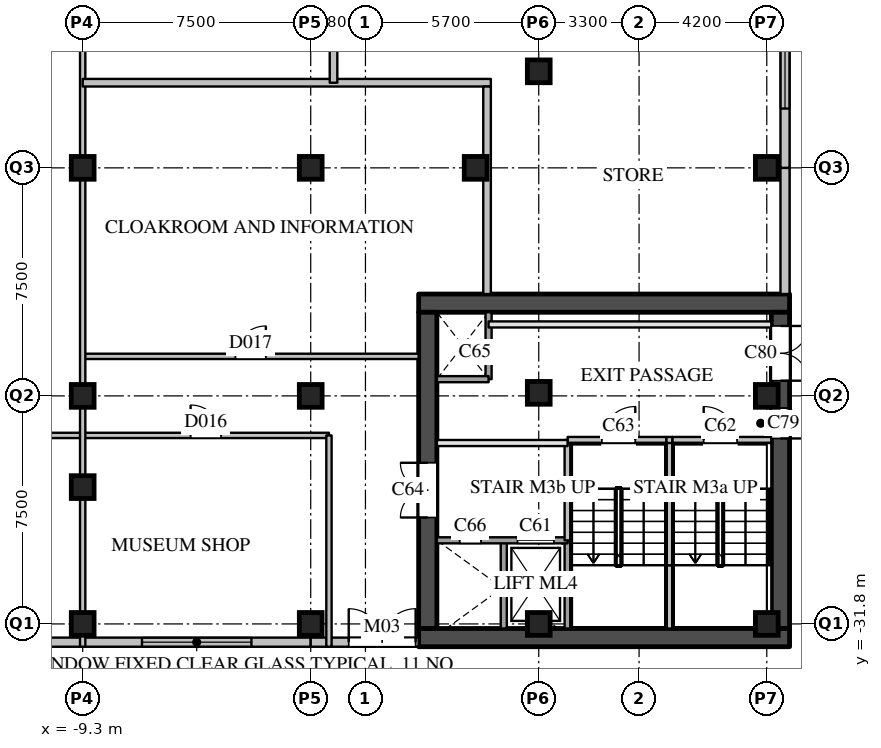
"""IFC4 building model, lengths in metres.
Left out: names, types, materials, properties, quantities, classifications, styles, units other than length and angle.
Written with IfcOpenShell. Run it as: python <this file> out.ifc"""

import sys

from ifc_helpers import new_model, si_unit, direction, frame, frame_2d, origin, origin_2d, place, context, subcontext, project, spatial, rectangle, extrude, element, fill, save


model = new_model("IFC4")
c1 = context("Model", 3, precision=1e-05, world=origin(), true_north=direction((0.0, 1.0)))
c2 = subcontext(c1, "Body", "Model", "MODEL_VIEW")
j1 = project(units=[si_unit("LENGTHUNIT", "METRE"), si_unit("PLANEANGLEUNIT", "RADIAN")], contexts=[c1])
p1 = place(None, origin())
s1 = spatial("IfcSite", under=j1, at=p1, CompositionType="ELEMENT")
p2 = place(p1, origin())
s2 = spatial("IfcBuilding", under=s1, at=p2, CompositionType="ELEMENT")
p3 = place(p2, origin())
s3 = spatial("IfcBuildingStorey", under=s2, at=p3, CompositionType="ELEMENT", Elevation=0.0)
for number, where, z_axis, x_axis in (
    (1, (-9.3, -31.8, 0.0), (0.0, 0.0, 1.0), (1.0, 0.0, 0.0)),
    (2, (-9.3, -24.3, 0.0), (0.0, 0.0, 1.0), (1.0, 0.0, 0.0)),
    (3, (-9.3, -16.8, 0.0), (0.0, 0.0, 1.0), (1.0, 0.0, 0.0)),
    (4, (-1.8, -31.8, 0.0), (0.0, 0.0, 1.0), (1.0, 0.0, 0.0)),
    (5, (-1.8, -24.3, 0.0), (0.0, 0.0, 1.0), (1.0, 0.0, 0.0)),
    (6, (-1.8, -16.8, 0.0), (0.0, 0.0, 1.0), (1.0, 0.0, 0.0)),
    (7, (5.7, -31.8, 0.0), (0.0, 0.0, 1.0), (1.0, 0.0, 0.0)),
    (8, (5.7, -24.2, 0.0), (0.0, 0.0, 1.0), (1.0, 0.0, 0.0)),
    (9, (13.2, -31.8, 0.0), (0.0, 0.0, 1.0), (1.0, 0.0, 0.0)),
    (10, (13.2, -24.3, 0.0), (0.0, 0.0, 1.0), (1.0, 0.0, 0.0)),
    (11, (13.2, -16.8, 0.0), (0.0, 0.0, 1.0), (1.0, 0.0, 0.0)),
    (12, (-9.3, -27.3, 0.0), (0.0, 0.0, 1.0), (1.0, 0.0, 0.0)),
    (13, (3.625, -16.8, 0.0), (0.0, 0.0, 1.0), (1.0, 0.0, 0.0)),
    (14, (5.7, -13.625, 0.0), (0.0, 0.0, 1.0), (1.0, 0.0, 0.0)),
):
    element("IfcColumn", number, at=place(p3, frame(where, z_axis=z_axis, x_axis=x_axis)), inside=s3, PredefinedType="COLUMN", context=c2, shape_type="SweptSolid", body=[
        extrude(rectangle(XDim=0.75, YDim=0.75, at=origin_2d()), origin(), (0.0, 0.0, 1.0), 8.0),
    ])
p4 = place(p3, frame((-16.8, -32.4, 0.0), z_axis=(0.0, 0.0, 1.0), x_axis=(1.0, 0.0, 0.0)))
e15 = element("IfcWall", 15, at=p4, inside=s3, PredefinedType="SOLIDWALL", context=c2, shape_type="SweptSolid", body=[
    extrude(rectangle(XDim=7.5, YDim=0.3, at=frame_2d((3.75, 0.0))), origin(), (0.0, 0.0, 1.0), 7.59),
])
p5 = place(p4, frame((1.25, 0.0, 0.0)))
e16 = element("IfcOpeningElement", 16, at=p5, cuts=e15, PredefinedType="OPENING", context=c2, shape_type="SweptSolid", body=[
    extrude(rectangle(XDim=2.2, YDim=2.4, at=frame_2d((1.1, 1.2))), frame((0.0, 0.16, 0.0), z_axis=(0.0, -1.0, 0.0), x_axis=(1.0, 0.0, 0.0)), (0.0, 0.0, 1.0), 0.32),
])
p6 = place(p4, frame((4.05, 0.0, 0.0)))
e17 = element("IfcOpeningElement", 17, at=p6, cuts=e15, PredefinedType="OPENING", context=c2, shape_type="SweptSolid", body=[
    extrude(rectangle(XDim=2.2, YDim=2.4, at=frame_2d((1.1, 1.2))), frame((0.0, 0.16, 0.0), z_axis=(0.0, -1.0, 0.0), x_axis=(1.0, 0.0, 0.0)), (0.0, 0.0, 1.0), 0.32),
])
p7 = place(p3, frame((-9.3, -32.4, 0.0), z_axis=(0.0, 0.0, 1.0), x_axis=(1.0, 0.0, 0.0)))
e18 = element("IfcWall", 18, at=p7, inside=s3, PredefinedType="SOLIDWALL", context=c2, shape_type="SweptSolid", body=[
    extrude(rectangle(XDim=7.5, YDim=0.3, at=frame_2d((3.75, 0.0))), origin(), (0.0, 0.0, 1.0), 7.59),
])
p8 = place(p7, frame((1.95, 0.0, 0.9)))
e19 = element("IfcOpeningElement", 19, at=p8, cuts=e18, PredefinedType="OPENING", context=c2, shape_type="SweptSolid", body=[
    extrude(rectangle(XDim=3.6, YDim=3.0, at=frame_2d((1.8, 1.5))), frame((0.0, 0.16, 0.0), z_axis=(0.0, -1.0, 0.0), x_axis=(1.0, 0.0, 0.0)), (0.0, 0.0, 1.0), 0.32),
])
p9 = place(p3, frame((-1.8, -32.4, 0.0), z_axis=(0.0, 0.0, 1.0), x_axis=(1.0, 0.0, 0.0)))
e20 = element("IfcWall", 20, at=p9, inside=s3, PredefinedType="SOLIDWALL", context=c2, shape_type="SweptSolid", body=[
    extrude(rectangle(XDim=3.55, YDim=0.3, at=frame_2d((1.775, 0.0))), origin(), (0.0, 0.0, 1.0), 7.59),
])
p10 = place(p9, frame((1.25, 0.0, 0.0)))
e21 = element("IfcOpeningElement", 21, at=p10, cuts=e20, PredefinedType="OPENING", context=c2, shape_type="SweptSolid", body=[
    extrude(rectangle(XDim=2.2, YDim=2.4, at=frame_2d((1.1, 1.2))), frame((0.0, 0.16, 0.0), z_axis=(0.0, -1.0, 0.0), x_axis=(1.0, 0.0, 0.0)), (0.0, 0.0, 1.0), 0.32),
])
p11 = place(p3, frame((13.8, -20.95, 0.0), z_axis=(0.0, 0.0, 1.0), x_axis=(0.0, 1.0, 0.0)))
e22 = element("IfcWall", 22, at=p11, inside=s3, PredefinedType="SOLIDWALL", context=c2, shape_type="SweptSolid", body=[
    extrude(rectangle(XDim=4.15, YDim=0.3, at=frame_2d((2.075, 0.0))), origin(), (0.0, 0.0, 1.0), 7.59),
])
p12 = place(p3, frame((13.8, -16.8, 0.0), z_axis=(0.0, 0.0, 1.0), x_axis=(0.0, 1.0, 0.0)))
e23 = element("IfcWall", 23, at=p12, inside=s3, PredefinedType="SOLIDWALL", context=c2, shape_type="SweptSolid", body=[
    extrude(rectangle(XDim=7.5, YDim=0.3, at=frame_2d((3.75, 0.0))), origin(), (0.0, 0.0, 1.0), 7.59),
])
p13 = place(p12, frame((1.95, 0.0, 0.9)))
e24 = element("IfcOpeningElement", 24, at=p13, cuts=e23, PredefinedType="OPENING", context=c2, shape_type="SweptSolid", body=[
    extrude(rectangle(XDim=3.6, YDim=3.0, at=frame_2d((1.8, 1.5))), frame((0.0, 0.16, 0.0), z_axis=(0.0, -1.0, 0.0), x_axis=(1.0, 0.0, 0.0)), (0.0, 0.0, 1.0), 0.32),
])
for number, where, z_axis, x_axis in (
    (25, (1.75, -32.25, 0.0), (0.0, 0.0, 1.0), (1.0, 0.0, 0.0)),
    (26, (1.75, -21.25, 0.0), (0.0, 0.0, 1.0), (1.0, 0.0, 0.0)),
):
    element("IfcWall", number, at=place(p3, frame(where, z_axis=z_axis, x_axis=x_axis)), inside=s3, PredefinedType="SHEAR", context=c2, shape_type="SweptSolid", body=[
        extrude(rectangle(XDim=12.2, YDim=0.6, at=frame_2d((6.1, 0.0))), origin(), (0.0, 0.0, 1.0), 7.59),
    ])
p14 = place(p3, frame((2.05, -31.95, 0.0), z_axis=(0.0, 0.0, 1.0), x_axis=(0.0, 1.0, 0.0)))
e27 = element("IfcWall", 27, at=p14, inside=s3, PredefinedType="SHEAR", context=c2, shape_type="SweptSolid", body=[
    extrude(rectangle(XDim=10.4, YDim=0.6, at=frame_2d((5.2, 0.0))), origin(), (0.0, 0.0, 1.0), 7.59),
])
p15 = place(p14, frame((3.65, 0.0, 0.0)))
e28 = element("IfcOpeningElement", 28, at=p15, cuts=e27, PredefinedType="OPENING", context=c2, shape_type="SweptSolid", body=[
    extrude(rectangle(XDim=1.8, YDim=2.1, at=frame_2d((0.9, 1.05))), frame((0.0, 0.31, 0.0), z_axis=(0.0, -1.0, 0.0), x_axis=(1.0, 0.0, 0.0)), (0.0, 0.0, 1.0), 0.62),
])
p16 = place(p3, frame((13.65, -31.95, 0.0), z_axis=(0.0, 0.0, 1.0), x_axis=(0.0, 1.0, 0.0)))
e29 = element("IfcWall", 29, at=p16, inside=s3, PredefinedType="SHEAR", context=c2, shape_type="SweptSolid", body=[
    extrude(rectangle(XDim=10.4, YDim=0.6, at=frame_2d((5.2, 0.0))), origin(), (0.0, 0.0, 1.0), 7.59),
])
p17 = place(p16, frame((7.25, 0.0, 0.0), z_axis=(0.0, 0.0, 1.0), x_axis=(-1.0, 0.0, 0.0)))
e30 = element("IfcOpeningElement", 30, at=p17, cuts=e29, PredefinedType="OPENING", context=c2, shape_type="SweptSolid", body=[
    extrude(rectangle(XDim=1.0, YDim=2.1, at=frame_2d((0.5, 1.05))), frame((0.0, 0.31, 0.0), z_axis=(0.0, -1.0, 0.0), x_axis=(1.0, 0.0, 0.0)), (0.0, 0.0, 1.0), 0.62),
])
p18 = place(p16, frame((9.95, 0.0, 0.0), z_axis=(0.0, 0.0, 1.0), x_axis=(-1.0, 0.0, 0.0)))
e31 = element("IfcOpeningElement", 31, at=p18, cuts=e29, PredefinedType="OPENING", context=c2, shape_type="SweptSolid", body=[
    extrude(rectangle(XDim=1.8, YDim=2.4, at=frame_2d((0.9, 1.2))), frame((0.0, 0.31, 0.0), z_axis=(0.0, -1.0, 0.0), x_axis=(1.0, 0.0, 0.0)), (0.0, 0.0, 1.0), 0.62),
])
p19 = place(p3, frame((4.05, -23.75, 0.0), z_axis=(0.0, 0.0, 1.0), x_axis=(0.0, 1.0, 0.0)))
e32 = element("IfcWall", 32, at=p19, inside=s3, PredefinedType="SOLIDWALL", context=c2, shape_type="SweptSolid", body=[
    extrude(rectangle(XDim=2.2, YDim=0.2, at=frame_2d((1.1, 0.0))), origin(), (0.0, 0.0, 1.0), 7.59),
])
p20 = place(p19, frame((0.55, 0.0, 0.0)))
e33 = element("IfcOpeningElement", 33, at=p20, cuts=e32, PredefinedType="OPENING", context=c2, shape_type="SweptSolid", body=[
    extrude(rectangle(XDim=0.7, YDim=2.1, at=frame_2d((0.35, 1.05))), frame((0.0, 0.11, 0.0), z_axis=(0.0, -1.0, 0.0), x_axis=(1.0, 0.0, 0.0)), (0.0, 0.0, 1.0), 0.22),
])
for number, where, z_axis, x_axis in (
    (34, (4.55, -31.95, 0.0), (0.0, 0.0, 1.0), (0.0, 1.0, 0.0)),
    (35, (6.65, -31.95, 0.0), (0.0, 0.0, 1.0), (0.0, 1.0, 0.0)),
):
    element("IfcWall", number, at=place(p3, frame(where, z_axis=z_axis, x_axis=x_axis)), inside=s3, PredefinedType="SOLIDWALL", context=c2, shape_type="SweptSolid", body=[
        extrude(rectangle(XDim=2.9, YDim=0.2, at=frame_2d((1.45, 0.0))), origin(), (0.0, 0.0, 1.0), 7.59),
    ])
p21 = place(p3, frame((6.65, -29.05, 0.0), z_axis=(0.0, 0.0, 1.0), x_axis=(0.0, 1.0, 0.0)))
e36 = element("IfcWall", 36, at=p21, inside=s3, PredefinedType="SOLIDWALL", context=c2, shape_type="SweptSolid", body=[
    extrude(rectangle(XDim=1.7, YDim=0.2, at=frame_2d((0.85, 0.0))), origin(), (0.0, 0.0, 1.0), 7.59),
])
p22 = place(p3, frame((6.65, -27.35, 0.0), z_axis=(0.0, 0.0, 1.0), x_axis=(0.0, 1.0, 0.0)))
e37 = element("IfcWall", 37, at=p22, inside=s3, PredefinedType="SOLIDWALL", context=c2, shape_type="SweptSolid", body=[
    extrude(rectangle(XDim=1.6, YDim=0.2, at=frame_2d((0.8, 0.0))), origin(), (0.0, 0.0, 1.0), 7.59),
])
p23 = place(p3, frame((10.0, -31.95, 0.0), z_axis=(0.0, 0.0, 1.0), x_axis=(0.0, 1.0, 0.0)))
e38 = element("IfcWall", 38, at=p23, inside=s3, PredefinedType="SOLIDWALL", context=c2, shape_type="SweptSolid", body=[
    extrude(rectangle(XDim=2.08, YDim=0.2, at=frame_2d((1.04, 0.0))), origin(), (0.0, 0.0, 1.0), 7.59),
])
p24 = place(p3, frame((10.0, -29.87, 0.0), z_axis=(0.0, 0.0, 1.0), x_axis=(0.0, 1.0, 0.0)))
e39 = element("IfcWall", 39, at=p24, inside=s3, PredefinedType="SOLIDWALL", context=c2, shape_type="SweptSolid", body=[
    extrude(rectangle(XDim=2.52, YDim=0.2, at=frame_2d((1.26, 0.0))), origin(), (0.0, 0.0, 1.0), 7.59),
])
p25 = place(p3, frame((10.0, -27.35, 0.0), z_axis=(0.0, 0.0, 1.0), x_axis=(0.0, 1.0, 0.0)))
e40 = element("IfcWall", 40, at=p25, inside=s3, PredefinedType="SOLIDWALL", context=c2, shape_type="SweptSolid", body=[
    extrude(rectangle(XDim=1.6, YDim=0.2, at=frame_2d((0.8, 0.0))), origin(), (0.0, 0.0, 1.0), 7.59),
])
p26 = place(p3, frame((2.35, -29.05, 0.0), z_axis=(0.0, 0.0, 1.0), x_axis=(1.0, 0.0, 0.0)))
e41 = element("IfcWall", 41, at=p26, inside=s3, PredefinedType="SOLIDWALL", context=c2, shape_type="SweptSolid", body=[
    extrude(rectangle(XDim=4.3, YDim=0.2, at=frame_2d((2.15, 0.0))), origin(), (0.0, 0.0, 1.0), 7.59),
])
p27 = place(p26, frame((2.65, 0.0, 0.0)))
e42 = element("IfcOpeningElement", 42, at=p27, cuts=e41, PredefinedType="OPENING", context=c2, shape_type="SweptSolid", body=[
    extrude(rectangle(XDim=1.2, YDim=2.1, at=frame_2d((0.6, 1.05))), frame((0.0, 0.11, 0.0), z_axis=(0.0, -1.0, 0.0), x_axis=(1.0, 0.0, 0.0)), (0.0, 0.0, 1.0), 0.22),
])
p28 = place(p26, frame((0.75, 0.0, 0.0)))
e43 = element("IfcOpeningElement", 43, at=p28, cuts=e41, PredefinedType="OPENING", context=c2, shape_type="SweptSolid", body=[
    extrude(rectangle(XDim=0.7, YDim=2.1, at=frame_2d((0.35, 1.05))), frame((0.0, 0.11, 0.0), z_axis=(0.0, -1.0, 0.0), x_axis=(1.0, 0.0, 0.0)), (0.0, 0.0, 1.0), 0.22),
])
p29 = place(p3, frame((2.35, -25.85, 0.0), z_axis=(0.0, 0.0, 1.0), x_axis=(1.0, 0.0, 0.0)))
e44 = element("IfcWall", 44, at=p29, inside=s3, PredefinedType="PARTITIONING", context=c2, shape_type="SweptSolid", body=[
    extrude(rectangle(XDim=4.3, YDim=0.2, at=frame_2d((2.15, 0.0))), origin(), (0.0, 0.0, 1.0), 7.59),
])
p30 = place(p3, frame((6.65, -25.75, 0.0), z_axis=(0.0, 0.0, 1.0), x_axis=(1.0, 0.0, 0.0)))
e45 = element("IfcWall", 45, at=p30, inside=s3, PredefinedType="SOLIDWALL", context=c2, shape_type="SweptSolid", body=[
    extrude(rectangle(XDim=3.25, YDim=0.2, at=frame_2d((1.625, 0.0))), origin(), (0.0, 0.0, 1.0), 7.59),
])
p31 = place(p30, frame((1.125, 0.0, 0.0)))
e46 = element("IfcOpeningElement", 46, at=p31, cuts=e45, PredefinedType="OPENING", context=c2, shape_type="SweptSolid", body=[
    extrude(rectangle(XDim=1.1, YDim=2.1, at=frame_2d((0.55, 1.05))), frame((0.0, 0.11, 0.0), z_axis=(0.0, -1.0, 0.0), x_axis=(1.0, 0.0, 0.0)), (0.0, 0.0, 1.0), 0.22),
])
p32 = place(p3, frame((9.9, -25.75, 0.0), z_axis=(0.0, 0.0, 1.0), x_axis=(1.0, 0.0, 0.0)))
e47 = element("IfcWall", 47, at=p32, inside=s3, PredefinedType="SOLIDWALL", context=c2, shape_type="SweptSolid", body=[
    extrude(rectangle(XDim=0.2, YDim=0.2, at=frame_2d((0.1, 0.0))), origin(), (0.0, 0.0, 1.0), 7.59),
])
p33 = place(p3, frame((10.1, -25.75, 0.0), z_axis=(0.0, 0.0, 1.0), x_axis=(1.0, 0.0, 0.0)))
e48 = element("IfcWall", 48, at=p33, inside=s3, PredefinedType="SOLIDWALL", context=c2, shape_type="SweptSolid", body=[
    extrude(rectangle(XDim=3.25, YDim=0.2, at=frame_2d((1.625, 0.0))), origin(), (0.0, 0.0, 1.0), 7.59),
])
p34 = place(p33, frame((1.025, 0.0, 0.0)))
e49 = element("IfcOpeningElement", 49, at=p34, cuts=e48, PredefinedType="OPENING", context=c2, shape_type="SweptSolid", body=[
    extrude(rectangle(XDim=1.1, YDim=2.1, at=frame_2d((0.55, 1.05))), frame((0.0, 0.11, 0.0), z_axis=(0.0, -1.0, 0.0), x_axis=(1.0, 0.0, 0.0)), (0.0, 0.0, 1.0), 0.22),
])
p35 = place(p3, frame((2.35, -23.75, 0.0), z_axis=(0.0, 0.0, 1.0), x_axis=(1.0, 0.0, 0.0)))
e50 = element("IfcWall", 50, at=p35, inside=s3, PredefinedType="SOLIDWALL", context=c2, shape_type="SweptSolid", body=[
    extrude(rectangle(XDim=1.7, YDim=0.2, at=frame_2d((0.85, 0.0))), origin(), (0.0, 0.0, 1.0), 7.59),
])
p36 = place(p3, frame((4.05, -21.95, 0.0), z_axis=(0.0, 0.0, 1.0), x_axis=(1.0, 0.0, 0.0)))
e51 = element("IfcWall", 51, at=p36, inside=s3, PredefinedType="PARTITIONING", context=c2, shape_type="SweptSolid", body=[
    extrude(rectangle(XDim=9.3, YDim=0.2, at=frame_2d((4.65, 0.0))), origin(), (0.0, 0.0, 1.0), 7.59),
])
p37 = place(p3, frame((-20.35, -25.6, 0.0), z_axis=(0.0, 0.0, 1.0), x_axis=(1.0, 0.0, 0.0)))
e52 = element("IfcWall", 52, at=p37, inside=s3, PredefinedType="PARTITIONING", context=c2, shape_type="SweptSolid", body=[
    extrude(rectangle(XDim=19.15, YDim=0.175, at=frame_2d((9.575, 0.0))), origin(), (0.0, 0.0, 1.0), 6.79),
])
p38 = place(p37, frame((4.625, 0.0, 0.0)))
e53 = element("IfcOpeningElement", 53, at=p38, cuts=e52, PredefinedType="OPENING", context=c2, shape_type="SweptSolid", body=[
    extrude(rectangle(XDim=1.8, YDim=2.1, at=frame_2d((0.9, 1.05))), frame((0.0, 0.097, 0.0), z_axis=(0.0, -1.0, 0.0), x_axis=(1.0, 0.0, 0.0)), (0.0, 0.0, 1.0), 0.195),
])
p39 = place(p37, frame((14.6, 0.0, 0.0)))
e54 = element("IfcOpeningElement", 54, at=p39, cuts=e52, PredefinedType="OPENING", context=c2, shape_type="SweptSolid", body=[
    extrude(rectangle(XDim=1.0, YDim=2.1, at=frame_2d((0.5, 1.05))), frame((0.0, 0.097, 0.0), z_axis=(0.0, -1.0, 0.0), x_axis=(1.0, 0.0, 0.0)), (0.0, 0.0, 1.0), 0.195),
])
p40 = place(p3, frame((-9.3, -23.0, 0.0), z_axis=(0.0, 0.0, 1.0), x_axis=(1.0, 0.0, 0.0)))
e55 = element("IfcWall", 55, at=p40, inside=s3, PredefinedType="PARTITIONING", context=c2, shape_type="SweptSolid", body=[
    extrude(rectangle(XDim=11.05, YDim=0.175, at=frame_2d((5.525, 0.0))), origin(), (0.0, 0.0, 1.0), 6.79),
])
p41 = place(p40, frame((5.025, 0.0, 0.0)))
e56 = element("IfcOpeningElement", 56, at=p41, cuts=e55, PredefinedType="OPENING", context=c2, shape_type="SweptSolid", body=[
    extrude(rectangle(XDim=1.0, YDim=2.1, at=frame_2d((0.5, 1.05))), frame((0.0, 0.097, 0.0), z_axis=(0.0, -1.0, 0.0), x_axis=(1.0, 0.0, 0.0)), (0.0, 0.0, 1.0), 0.195),
])
p42 = place(p3, frame((-9.3, -32.55, 0.0), z_axis=(0.0, 0.0, 1.0), x_axis=(0.0, 1.0, 0.0)))
e57 = element("IfcWall", 57, at=p42, inside=s3, PredefinedType="PARTITIONING", context=c2, shape_type="SweptSolid", body=[
    extrude(rectangle(XDim=23.25, YDim=0.175, at=frame_2d((11.625, 0.0))), origin(), (0.0, 0.0, 1.0), 6.79),
])
p43 = place(p3, frame((-1.2, -32.55, 0.0), z_axis=(0.0, 0.0, 1.0), x_axis=(0.0, 1.0, 0.0)))
e58 = element("IfcWall", 58, at=p43, inside=s3, PredefinedType="PARTITIONING", context=c2, shape_type="SweptSolid", body=[
    extrude(rectangle(XDim=6.95, YDim=0.175, at=frame_2d((3.475, 0.0))), origin(), (0.0, 0.0, 1.0), 7.59),
])
p44 = place(p3, frame((-9.3, -14.0, 0.0), z_axis=(0.0, 0.0, 1.0), x_axis=(1.0, 0.0, 0.0)))
e59 = element("IfcWall", 59, at=p44, inside=s3, PredefinedType="PARTITIONING", context=c2, shape_type="SweptSolid", body=[
    extrude(rectangle(XDim=13.425, YDim=0.25, at=frame_2d((6.712, 0.0))), origin(), (0.0, 0.0, 1.0), 6.79),
])
p45 = place(p3, frame((-1.05, -14.0, 0.0), z_axis=(0.0, 0.0, 1.0), x_axis=(0.0, 1.0, 0.0)))
e60 = element("IfcWall", 60, at=p45, inside=s3, PredefinedType="PARTITIONING", context=c2, shape_type="SweptSolid", body=[
    extrude(rectangle(XDim=9.95, YDim=0.25, at=frame_2d((4.975, 0.0))), origin(), (0.0, 0.0, 1.0), 6.79),
])
p46 = place(p3, frame((4.0, -20.95, 0.0), z_axis=(0.0, 0.0, 1.0), x_axis=(0.0, 1.0, 0.0)))
e61 = element("IfcWall", 61, at=p46, inside=s3, PredefinedType="PARTITIONING", context=c2, shape_type="SweptSolid", body=[
    extrude(rectangle(XDim=6.825, YDim=0.25, at=frame_2d((3.413, 0.0))), origin(), (0.0, 0.0, 1.0), 7.59),
])
p47 = place(p8, origin())
e62 = element("IfcWindow", 62, at=p47, inside=s3, PartitioningType="SINGLE_PANEL", PredefinedType="WINDOW", context=c2, shape_type="SweptSolid", body=[
    extrude(rectangle(XDim=3.6, YDim=3.0, at=frame_2d((1.8, 1.5))), frame((0.0, 0.03, 0.0), z_axis=(0.0, -1.0, 0.0), x_axis=(1.0, 0.0, 0.0)), (0.0, 0.0, 1.0), 0.06),
])
fill(e19, e62)
p48 = place(p10, origin())
e63 = element("IfcDoor", 63, at=p48, inside=s3, OperationType="DOUBLE_DOOR_SINGLE_SWING", PredefinedType="DOOR", context=c2, shape_type="SweptSolid", body=[
    extrude(rectangle(XDim=2.2, YDim=2.4, at=frame_2d((1.1, 1.2))), frame((0.0, 0.025, 0.0), z_axis=(0.0, -1.0, 0.0), x_axis=(1.0, 0.0, 0.0)), (0.0, 0.0, 1.0), 0.05),
])
fill(e21, e63)
p49 = place(p13, origin())
e64 = element("IfcWindow", 64, at=p49, inside=s3, PartitioningType="SINGLE_PANEL", PredefinedType="WINDOW", context=c2, shape_type="SweptSolid", body=[
    extrude(rectangle(XDim=3.6, YDim=3.0, at=frame_2d((1.8, 1.5))), frame((0.0, 0.03, 0.0), z_axis=(0.0, -1.0, 0.0), x_axis=(1.0, 0.0, 0.0)), (0.0, 0.0, 1.0), 0.06),
])
fill(e24, e64)
p50 = place(p27, origin())
e65 = element("IfcDoor", 65, at=p50, inside=s3, OperationType="SLIDING_TO_LEFT", PredefinedType="DOOR", context=c2, shape_type="SweptSolid", body=[
    extrude(rectangle(XDim=1.2, YDim=2.1, at=frame_2d((0.6, 1.05))), frame((0.0, 0.025, 0.0), z_axis=(0.0, -1.0, 0.0), x_axis=(1.0, 0.0, 0.0)), (0.0, 0.0, 1.0), 0.05),
])
fill(e42, e65)
p51 = place(p34, origin())
e66 = element("IfcDoor", 66, at=p51, inside=s3, OperationType="SINGLE_SWING_LEFT", PredefinedType="DOOR", context=c2, shape_type="SweptSolid", body=[
    extrude(rectangle(XDim=1.1, YDim=2.1, at=frame_2d((0.55, 1.05))), frame((0.0, 0.025, 0.0), z_axis=(0.0, -1.0, 0.0), x_axis=(1.0, 0.0, 0.0)), (0.0, 0.0, 1.0), 0.05),
])
fill(e49, e66)
p52 = place(p31, origin())
e67 = element("IfcDoor", 67, at=p52, inside=s3, OperationType="SINGLE_SWING_RIGHT", PredefinedType="DOOR", context=c2, shape_type="SweptSolid", body=[
    extrude(rectangle(XDim=1.1, YDim=2.1, at=frame_2d((0.55, 1.05))), frame((0.0, 0.025, 0.0), z_axis=(0.0, -1.0, 0.0), x_axis=(1.0, 0.0, 0.0)), (0.0, 0.0, 1.0), 0.05),
])
fill(e46, e67)
p53 = place(p15, origin())
e68 = element("IfcDoor", 68, at=p53, inside=s3, OperationType="DOUBLE_DOOR_SINGLE_SWING", PredefinedType="DOOR", context=c2, shape_type="SweptSolid", body=[
    extrude(rectangle(XDim=1.8, YDim=2.1, at=frame_2d((0.9, 1.05))), frame((0.0, 0.025, 0.0), z_axis=(0.0, -1.0, 0.0), x_axis=(1.0, 0.0, 0.0)), (0.0, 0.0, 1.0), 0.05),
])
fill(e28, e68)
p54 = place(p20, origin())
e69 = element("IfcDoor", 69, at=p54, inside=s3, OperationType="SINGLE_SWING_LEFT", PredefinedType="DOOR", context=c2, shape_type="SweptSolid", body=[
    extrude(rectangle(XDim=0.7, YDim=2.1, at=frame_2d((0.35, 1.05))), frame((0.0, 0.025, 0.0), z_axis=(0.0, -1.0, 0.0), x_axis=(1.0, 0.0, 0.0)), (0.0, 0.0, 1.0), 0.05),
])
fill(e33, e69)
p55 = place(p28, origin())
e70 = element("IfcDoor", 70, at=p55, inside=s3, OperationType="SINGLE_SWING_LEFT", PredefinedType="DOOR", context=c2, shape_type="SweptSolid", body=[
    extrude(rectangle(XDim=0.7, YDim=2.1, at=frame_2d((0.35, 1.05))), frame((0.0, 0.025, 0.0), z_axis=(0.0, -1.0, 0.0), x_axis=(1.0, 0.0, 0.0)), (0.0, 0.0, 1.0), 0.05),
])
fill(e43, e70)
p56 = place(p17, origin())
e71 = element("IfcDoor", 71, at=p56, inside=s3, OperationType="SINGLE_SWING_RIGHT", PredefinedType="DOOR", context=c2, shape_type="SweptSolid", body=[
    extrude(rectangle(XDim=1.0, YDim=2.1, at=frame_2d((0.5, 1.05))), frame((0.0, 0.025, 0.0), z_axis=(0.0, -1.0, 0.0), x_axis=(1.0, 0.0, 0.0)), (0.0, 0.0, 1.0), 0.05),
])
fill(e30, e71)
p57 = place(p18, origin())
e72 = element("IfcDoor", 72, at=p57, inside=s3, OperationType="DOUBLE_DOOR_SINGLE_SWING", PredefinedType="DOOR", context=c2, shape_type="SweptSolid", body=[
    extrude(rectangle(XDim=1.8, YDim=2.4, at=frame_2d((0.9, 1.2))), frame((0.0, 0.025, 0.0), z_axis=(0.0, -1.0, 0.0), x_axis=(1.0, 0.0, 0.0)), (0.0, 0.0, 1.0), 0.05),
])
fill(e31, e72)
p58 = place(p39, origin())
e73 = element("IfcDoor", 73, at=p58, inside=s3, OperationType="SINGLE_SWING_LEFT", PredefinedType="DOOR", context=c2, shape_type="SweptSolid", body=[
    extrude(rectangle(XDim=1.0, YDim=2.1, at=frame_2d((0.5, 1.05))), frame((0.0, 0.025, 0.0), z_axis=(0.0, -1.0, 0.0), x_axis=(1.0, 0.0, 0.0)), (0.0, 0.0, 1.0), 0.05),
])
fill(e54, e73)
p59 = place(p41, origin())
e74 = element("IfcDoor", 74, at=p59, inside=s3, OperationType="SINGLE_SWING_RIGHT", PredefinedType="DOOR", context=c2, shape_type="SweptSolid", body=[
    extrude(rectangle(XDim=1.0, YDim=2.1, at=frame_2d((0.5, 1.05))), frame((0.0, 0.025, 0.0), z_axis=(0.0, -1.0, 0.0), x_axis=(1.0, 0.0, 0.0)), (0.0, 0.0, 1.0), 0.05),
])
fill(e56, e74)
save(model, sys.argv[1])
